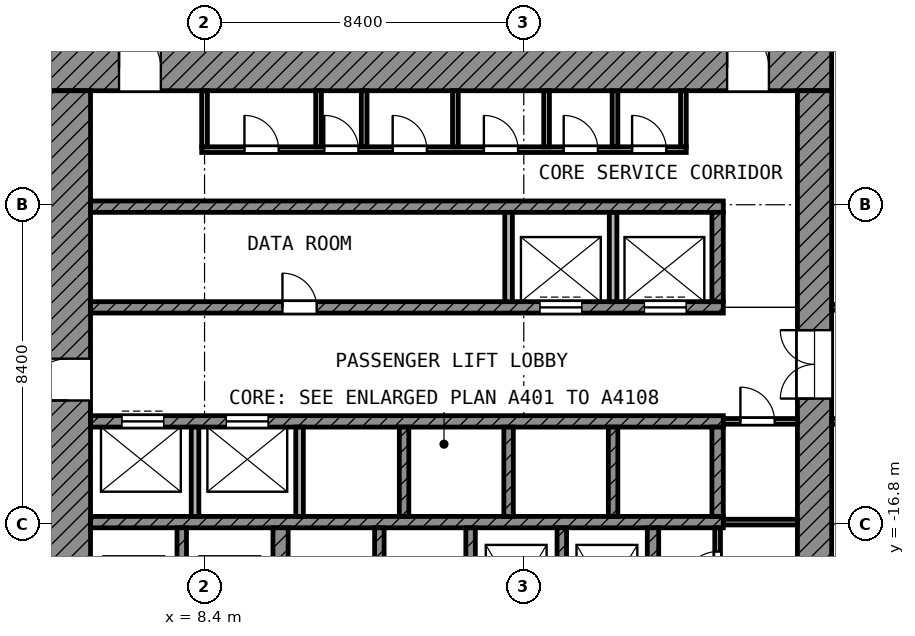
"""IFC4 building model, lengths in metres.
Left out: names, types, materials, properties, quantities, classifications, styles, units other than length and angle.
Written with IfcOpenShell. Run it as: python <this file> out.ifc"""

import sys

from ifc_helpers import new_model, si_unit, direction, frame, frame_2d, origin, place, context, subcontext, project, spatial, rectangle, extrude, element, fill, save


model = new_model("IFC4")
c1 = context("Model", 3, precision=1e-05, world=origin(), true_north=direction((0.0, 1.0)))
c2 = subcontext(c1, "Body", "Model", "MODEL_VIEW")
j1 = project(units=[si_unit("LENGTHUNIT", "METRE"), si_unit("PLANEANGLEUNIT", "RADIAN")], contexts=[c1])
p1 = place(None, origin())
s1 = spatial("IfcSite", under=j1, at=p1, CompositionType="ELEMENT")
p2 = place(p1, origin())
s2 = spatial("IfcBuilding", under=s1, at=p2, CompositionType="ELEMENT")
p3 = place(p2, frame((0.0, 0.0, 196.2)))
s3 = spatial("IfcBuildingStorey", under=s2, at=p3, CompositionType="ELEMENT", Elevation=196.2)
p4 = place(p3, frame((4.2, -4.8, 0.0), z_axis=(0.0, 0.0, 1.0), x_axis=(1.0, 0.0, 0.0)))
e1 = element("IfcWall", 1, at=p4, inside=s3, PredefinedType="SHEAR", context=c2, shape_type="SweptSolid", body=[
    extrude(rectangle(XDim=20.7, YDim=1.2, at=frame_2d((10.35, 0.0))), origin(), (0.0, 0.0, 1.0), 3.6),
])
p5 = place(p4, frame((1.95, 0.0, 0.0)))
e2 = element("IfcOpeningElement", 2, at=p5, cuts=e1, PredefinedType="OPENING", context=c2, shape_type="SweptSolid", body=[
    extrude(rectangle(XDim=1.1, YDim=2.1, at=frame_2d((0.55, 1.05))), frame((0.0, 0.61, 0.0), z_axis=(0.0, -1.0, 0.0), x_axis=(1.0, 0.0, 0.0)), (0.0, 0.0, 1.0), 1.22),
])
p6 = place(p4, frame((17.95, 0.0, 0.0)))
e3 = element("IfcOpeningElement", 3, at=p6, cuts=e1, PredefinedType="OPENING", context=c2, shape_type="SweptSolid", body=[
    extrude(rectangle(XDim=1.1, YDim=2.1, at=frame_2d((0.55, 1.05))), frame((0.0, 0.61, 0.0), z_axis=(0.0, -1.0, 0.0), x_axis=(1.0, 0.0, 0.0)), (0.0, 0.0, 1.0), 1.22),
])
p7 = place(p3, frame((4.8, -24.9, 0.0), z_axis=(0.0, 0.0, 1.0), x_axis=(0.0, 1.0, 0.0)))
e4 = element("IfcWall", 4, at=p7, inside=s3, PredefinedType="SHEAR", context=c2, shape_type="SweptSolid", body=[
    extrude(rectangle(XDim=19.5, YDim=1.2, at=frame_2d((9.75, 0.0))), origin(), (0.0, 0.0, 1.0), 3.6),
])
p8 = place(p7, frame((11.35, 0.0, 0.0)))
e5 = element("IfcOpeningElement", 5, at=p8, cuts=e4, PredefinedType="OPENING", context=c2, shape_type="SweptSolid", body=[
    extrude(rectangle(XDim=1.1, YDim=2.1, at=frame_2d((0.55, 1.05))), frame((0.0, 0.61, 0.0), z_axis=(0.0, -1.0, 0.0), x_axis=(1.0, 0.0, 0.0)), (0.0, 0.0, 1.0), 1.22),
])
p9 = place(p7, frame((2.05, 0.0, 0.0)))
e6 = element("IfcOpeningElement", 6, at=p9, cuts=e4, PredefinedType="OPENING", context=c2, shape_type="SweptSolid", body=[
    extrude(rectangle(XDim=1.1, YDim=2.1, at=frame_2d((0.55, 1.05))), frame((0.0, 0.61, 0.0), z_axis=(0.0, -1.0, 0.0), x_axis=(1.0, 0.0, 0.0)), (0.0, 0.0, 1.0), 1.22),
])
p10 = place(p3, frame((24.45, -24.0, 0.0), z_axis=(0.0, 0.0, 1.0), x_axis=(0.0, 1.0, 0.0)))
e7 = element("IfcWall", 7, at=p10, inside=s3, PredefinedType="SHEAR", context=c2, shape_type="SweptSolid", body=[
    extrude(rectangle(XDim=18.6, YDim=0.9, at=frame_2d((9.3, 0.0))), origin(), (0.0, 0.0, 1.0), 3.6),
])
p11 = place(p10, frame((10.5, 0.0, 0.0)))
e8 = element("IfcOpeningElement", 8, at=p11, cuts=e7, PredefinedType="OPENING", context=c2, shape_type="SweptSolid", body=[
    extrude(rectangle(XDim=1.8, YDim=2.1, at=frame_2d((0.9, 1.05))), frame((0.0, 0.46, 0.0), z_axis=(0.0, -1.0, 0.0), x_axis=(1.0, 0.0, 0.0)), (0.0, 0.0, 1.0), 0.92),
])
p12 = place(p3, frame((5.4, -8.45, 0.0), z_axis=(0.0, 0.0, 1.0), x_axis=(1.0, 0.0, 0.0)))
e9 = element("IfcWall", 9, at=p12, inside=s3, PredefinedType="SHEAR", context=c2, shape_type="SweptSolid", body=[
    extrude(rectangle(XDim=16.65, YDim=0.3, at=frame_2d((8.325, 0.0))), origin(), (0.0, 0.0, 1.0), 3.6),
])
p13 = place(p3, frame((5.4, -11.1, 0.0), z_axis=(0.0, 0.0, 1.0), x_axis=(1.0, 0.0, 0.0)))
e10 = element("IfcWall", 10, at=p13, inside=s3, PredefinedType="SHEAR", context=c2, shape_type="SweptSolid", body=[
    extrude(rectangle(XDim=16.65, YDim=0.3, at=frame_2d((8.325, 0.0))), origin(), (0.0, 0.0, 1.0), 3.6),
])
p14 = place(p13, frame((11.825, 0.0, 0.0)))
e11 = element("IfcOpeningElement", 11, at=p14, cuts=e10, PredefinedType="OPENING", context=c2, shape_type="SweptSolid", body=[
    extrude(rectangle(XDim=1.1, YDim=2.1, at=frame_2d((0.55, 1.05))), frame((0.0, 0.16, 0.0), z_axis=(0.0, -1.0, 0.0), x_axis=(1.0, 0.0, 0.0)), (0.0, 0.0, 1.0), 0.32),
])
p15 = place(p13, frame((14.575, 0.0, 0.0)))
e12 = element("IfcOpeningElement", 12, at=p15, cuts=e10, PredefinedType="OPENING", context=c2, shape_type="SweptSolid", body=[
    extrude(rectangle(XDim=1.1, YDim=2.1, at=frame_2d((0.55, 1.05))), frame((0.0, 0.16, 0.0), z_axis=(0.0, -1.0, 0.0), x_axis=(1.0, 0.0, 0.0)), (0.0, 0.0, 1.0), 0.32),
])
p16 = place(p13, frame((5.05, 0.0, 0.0)))
e13 = element("IfcOpeningElement", 13, at=p16, cuts=e10, PredefinedType="OPENING", context=c2, shape_type="SweptSolid", body=[
    extrude(rectangle(XDim=0.9, YDim=2.1, at=frame_2d((0.45, 1.05))), frame((0.0, 0.16, 0.0), z_axis=(0.0, -1.0, 0.0), x_axis=(1.0, 0.0, 0.0)), (0.0, 0.0, 1.0), 0.32),
])
p17 = place(p3, frame((5.4, -14.1, 0.0), z_axis=(0.0, 0.0, 1.0), x_axis=(1.0, 0.0, 0.0)))
e14 = element("IfcWall", 14, at=p17, inside=s3, PredefinedType="SHEAR", context=c2, shape_type="SweptSolid", body=[
    extrude(rectangle(XDim=16.65, YDim=0.3, at=frame_2d((8.325, 0.0))), origin(), (0.0, 0.0, 1.0), 3.6),
])
p18 = place(p17, frame((0.825, 0.0, 0.0)))
e15 = element("IfcOpeningElement", 15, at=p18, cuts=e14, PredefinedType="OPENING", context=c2, shape_type="SweptSolid", body=[
    extrude(rectangle(XDim=1.1, YDim=2.1, at=frame_2d((0.55, 1.05))), frame((0.0, 0.16, 0.0), z_axis=(0.0, -1.0, 0.0), x_axis=(1.0, 0.0, 0.0)), (0.0, 0.0, 1.0), 0.32),
])
p19 = place(p17, frame((3.575, 0.0, 0.0)))
e16 = element("IfcOpeningElement", 16, at=p19, cuts=e14, PredefinedType="OPENING", context=c2, shape_type="SweptSolid", body=[
    extrude(rectangle(XDim=1.1, YDim=2.1, at=frame_2d((0.55, 1.05))), frame((0.0, 0.16, 0.0), z_axis=(0.0, -1.0, 0.0), x_axis=(1.0, 0.0, 0.0)), (0.0, 0.0, 1.0), 0.32),
])
p20 = place(p3, frame((5.4, -16.75, 0.0), z_axis=(0.0, 0.0, 1.0), x_axis=(1.0, 0.0, 0.0)))
e17 = element("IfcWall", 17, at=p20, inside=s3, PredefinedType="SHEAR", context=c2, shape_type="SweptSolid", body=[
    extrude(rectangle(XDim=16.65, YDim=0.3, at=frame_2d((8.325, 0.0))), origin(), (0.0, 0.0, 1.0), 3.6),
])
p21 = place(p3, frame((10.4, -20.05, 0.0), z_axis=(0.0, 0.0, 1.0), x_axis=(0.0, 1.0, 0.0)))
e18 = element("IfcWall", 18, at=p21, inside=s3, PredefinedType="SHEAR", context=c2, shape_type="SweptSolid", body=[
    extrude(rectangle(XDim=3.15, YDim=0.4, at=frame_2d((1.575, 0.0))), origin(), (0.0, 0.0, 1.0), 3.6),
])
p22 = place(p3, frame((20.2, -20.35, 0.0), z_axis=(0.0, 0.0, 1.0), x_axis=(0.0, 1.0, 0.0)))
e19 = element("IfcWall", 19, at=p22, inside=s3, PredefinedType="SHEAR", context=c2, shape_type="SweptSolid", body=[
    extrude(rectangle(XDim=3.45, YDim=0.3, at=frame_2d((1.725, 0.0))), origin(), (0.0, 0.0, 1.0), 3.6),
])
p23 = place(p3, frame((21.9, -10.95, 0.0), z_axis=(0.0, 0.0, 1.0), x_axis=(0.0, 1.0, 0.0)))
e20 = element("IfcWall", 20, at=p23, inside=s3, PredefinedType="SHEAR", context=c2, shape_type="SweptSolid", body=[
    extrude(rectangle(XDim=2.35, YDim=0.3, at=frame_2d((1.175, 0.0))), origin(), (0.0, 0.0, 1.0), 3.6),
])
p24 = place(p3, frame((21.9, -16.6, 0.0), z_axis=(0.0, 0.0, 1.0), x_axis=(0.0, 1.0, 0.0)))
e21 = element("IfcWall", 21, at=p24, inside=s3, PredefinedType="SHEAR", context=c2, shape_type="SweptSolid", body=[
    extrude(rectangle(XDim=2.35, YDim=0.3, at=frame_2d((1.175, 0.0))), origin(), (0.0, 0.0, 1.0), 3.6),
])
for number, where, z_axis, x_axis in (
    (22, (7.8, -20.05, 0.0), (0.0, 0.0, 1.0), (0.0, 1.0, 0.0)),
    (23, (13.0, -20.05, 0.0), (0.0, 0.0, 1.0), (0.0, 1.0, 0.0)),
    (24, (15.4, -20.05, 0.0), (0.0, 0.0, 1.0), (0.0, 1.0, 0.0)),
    (25, (17.8, -20.05, 0.0), (0.0, 0.0, 1.0), (0.0, 1.0, 0.0)),
):
    element("IfcWall", number, at=place(p3, frame(where, z_axis=z_axis, x_axis=x_axis)), inside=s3, PredefinedType="SHEAR", context=c2, shape_type="SweptSolid", body=[
        extrude(rectangle(XDim=3.15, YDim=0.25, at=frame_2d((1.575, 0.0))), origin(), (0.0, 0.0, 1.0), 3.6),
    ])
for number, where, z_axis, x_axis in (
    (26, (16.4, -10.95, 0.0), (0.0, 0.0, 1.0), (0.0, 1.0, 0.0)),
    (27, (19.15, -10.95, 0.0), (0.0, 0.0, 1.0), (0.0, 1.0, 0.0)),
):
    element("IfcWall", number, at=place(p3, frame(where, z_axis=z_axis, x_axis=x_axis)), inside=s3, PredefinedType="PARTITIONING", context=c2, shape_type="SweptSolid", body=[
        extrude(rectangle(XDim=2.35, YDim=0.2, at=frame_2d((1.175, 0.0))), origin(), (0.0, 0.0, 1.0), 3.6),
    ])
for number, where, z_axis, x_axis in (
    (28, (8.15, -16.6, 0.0), (0.0, 0.0, 1.0), (0.0, 1.0, 0.0)),
    (29, (10.9, -16.6, 0.0), (0.0, 0.0, 1.0), (0.0, 1.0, 0.0)),
):
    element("IfcWall", number, at=place(p3, frame(where, z_axis=z_axis, x_axis=x_axis)), inside=s3, PredefinedType="PARTITIONING", context=c2, shape_type="SweptSolid", body=[
        extrude(rectangle(XDim=2.35, YDim=0.2, at=frame_2d((1.175, 0.0))), origin(), (0.0, 0.0, 1.0), 3.6),
    ])
for number, where, z_axis, x_axis in (
    (30, (13.65, -16.6, 0.0), (0.0, 0.0, 1.0), (0.0, 1.0, 0.0)),
    (31, (16.4, -16.6, 0.0), (0.0, 0.0, 1.0), (0.0, 1.0, 0.0)),
    (32, (19.15, -16.6, 0.0), (0.0, 0.0, 1.0), (0.0, 1.0, 0.0)),
):
    element("IfcWall", number, at=place(p3, frame(where, z_axis=z_axis, x_axis=x_axis)), inside=s3, PredefinedType="SHEAR", context=c2, shape_type="SweptSolid", body=[
        extrude(rectangle(XDim=2.35, YDim=0.25, at=frame_2d((1.175, 0.0))), origin(), (0.0, 0.0, 1.0), 3.6),
    ])
p25 = place(p3, frame((21.9, -19.05, 0.0), z_axis=(0.0, 0.0, 1.0), x_axis=(0.0, 1.0, 0.0)))
e33 = element("IfcWall", 33, at=p25, inside=s3, PredefinedType="PARTITIONING", context=c2, shape_type="SweptSolid", body=[
    extrude(rectangle(XDim=2.15, YDim=0.15, at=frame_2d((1.075, 0.0))), origin(), (0.0, 0.0, 1.0), 3.6),
])
p26 = place(p25, frame((0.625, 0.0, 0.0)))
e34 = element("IfcOpeningElement", 34, at=p26, cuts=e33, PredefinedType="OPENING", context=c2, shape_type="SweptSolid", body=[
    extrude(rectangle(XDim=0.9, YDim=2.1, at=frame_2d((0.45, 1.05))), frame((0.0, 0.085, 0.0), z_axis=(0.0, -1.0, 0.0), x_axis=(1.0, 0.0, 0.0)), (0.0, 0.0, 1.0), 0.17),
])
p27 = place(p3, frame((22.05, -16.75, 0.0), z_axis=(0.0, 0.0, 1.0), x_axis=(1.0, 0.0, 0.0)))
e35 = element("IfcWall", 35, at=p27, inside=s3, PredefinedType="PARTITIONING", context=c2, shape_type="SweptSolid", body=[
    extrude(rectangle(XDim=1.95, YDim=0.15, at=frame_2d((0.975, 0.0))), origin(), (0.0, 0.0, 1.0), 3.6),
])
p28 = place(p3, frame((22.05, -14.1, 0.0), z_axis=(0.0, 0.0, 1.0), x_axis=(1.0, 0.0, 0.0)))
e36 = element("IfcWall", 36, at=p28, inside=s3, PredefinedType="PARTITIONING", context=c2, shape_type="SweptSolid", body=[
    extrude(rectangle(XDim=1.95, YDim=0.15, at=frame_2d((0.975, 0.0))), origin(), (0.0, 0.0, 1.0), 3.6),
])
p29 = place(p28, frame((0.45, 0.0, 0.0)))
e37 = element("IfcOpeningElement", 37, at=p29, cuts=e36, PredefinedType="OPENING", context=c2, shape_type="SweptSolid", body=[
    extrude(rectangle(XDim=0.9, YDim=2.1, at=frame_2d((0.45, 1.05))), frame((0.0, 0.085, 0.0), z_axis=(0.0, -1.0, 0.0), x_axis=(1.0, 0.0, 0.0)), (0.0, 0.0, 1.0), 0.17),
])
p30 = place(p3, frame((8.325, -6.95, 0.0), z_axis=(0.0, 0.0, 1.0), x_axis=(1.0, 0.0, 0.0)))
e38 = element("IfcWall", 38, at=p30, inside=s3, PredefinedType="PARTITIONING", context=c2, shape_type="SweptSolid", body=[
    extrude(rectangle(XDim=12.75, YDim=0.15, at=frame_2d((6.375, 0.0))), origin(), (0.0, 0.0, 1.0), 3.6),
])
p31 = place(p30, frame((1.125, 0.0, 0.0)))
e39 = element("IfcOpeningElement", 39, at=p31, cuts=e38, PredefinedType="OPENING", context=c2, shape_type="SweptSolid", body=[
    extrude(rectangle(XDim=0.9, YDim=2.1, at=frame_2d((0.45, 1.05))), frame((0.0, 0.085, 0.0), z_axis=(0.0, -1.0, 0.0), x_axis=(1.0, 0.0, 0.0)), (0.0, 0.0, 1.0), 0.17),
])
p32 = place(p30, frame((3.225, 0.0, 0.0)))
e40 = element("IfcOpeningElement", 40, at=p32, cuts=e38, PredefinedType="OPENING", context=c2, shape_type="SweptSolid", body=[
    extrude(rectangle(XDim=0.9, YDim=2.1, at=frame_2d((0.45, 1.05))), frame((0.0, 0.085, 0.0), z_axis=(0.0, -1.0, 0.0), x_axis=(1.0, 0.0, 0.0)), (0.0, 0.0, 1.0), 0.17),
])
p33 = place(p30, frame((5.025, 0.0, 0.0)))
e41 = element("IfcOpeningElement", 41, at=p33, cuts=e38, PredefinedType="OPENING", context=c2, shape_type="SweptSolid", body=[
    extrude(rectangle(XDim=0.9, YDim=2.1, at=frame_2d((0.45, 1.05))), frame((0.0, 0.085, 0.0), z_axis=(0.0, -1.0, 0.0), x_axis=(1.0, 0.0, 0.0)), (0.0, 0.0, 1.0), 0.17),
])
p34 = place(p30, frame((7.425, 0.0, 0.0)))
e42 = element("IfcOpeningElement", 42, at=p34, cuts=e38, PredefinedType="OPENING", context=c2, shape_type="SweptSolid", body=[
    extrude(rectangle(XDim=0.9, YDim=2.1, at=frame_2d((0.45, 1.05))), frame((0.0, 0.085, 0.0), z_axis=(0.0, -1.0, 0.0), x_axis=(1.0, 0.0, 0.0)), (0.0, 0.0, 1.0), 0.17),
])
p35 = place(p30, frame((9.525, 0.0, 0.0)))
e43 = element("IfcOpeningElement", 43, at=p35, cuts=e38, PredefinedType="OPENING", context=c2, shape_type="SweptSolid", body=[
    extrude(rectangle(XDim=0.9, YDim=2.1, at=frame_2d((0.45, 1.05))), frame((0.0, 0.085, 0.0), z_axis=(0.0, -1.0, 0.0), x_axis=(1.0, 0.0, 0.0)), (0.0, 0.0, 1.0), 0.17),
])
p36 = place(p30, frame((11.325, 0.0, 0.0)))
e44 = element("IfcOpeningElement", 44, at=p36, cuts=e38, PredefinedType="OPENING", context=c2, shape_type="SweptSolid", body=[
    extrude(rectangle(XDim=0.9, YDim=2.1, at=frame_2d((0.45, 1.05))), frame((0.0, 0.085, 0.0), z_axis=(0.0, -1.0, 0.0), x_axis=(1.0, 0.0, 0.0)), (0.0, 0.0, 1.0), 0.17),
])
for number, where, z_axis, x_axis in (
    (45, (8.4, -6.875, 0.0), (0.0, 0.0, 1.0), (0.0, 1.0, 0.0)),
    (46, (11.4, -6.875, 0.0), (0.0, 0.0, 1.0), (0.0, 1.0, 0.0)),
    (47, (12.6, -6.875, 0.0), (0.0, 0.0, 1.0), (0.0, 1.0, 0.0)),
    (48, (15.0, -6.875, 0.0), (0.0, 0.0, 1.0), (0.0, 1.0, 0.0)),
    (49, (17.4, -6.875, 0.0), (0.0, 0.0, 1.0), (0.0, 1.0, 0.0)),
    (50, (19.2, -6.875, 0.0), (0.0, 0.0, 1.0), (0.0, 1.0, 0.0)),
    (51, (21.0, -6.875, 0.0), (0.0, 0.0, 1.0), (0.0, 1.0, 0.0)),
):
    element("IfcWall", number, at=place(p3, frame(where, z_axis=z_axis, x_axis=x_axis)), inside=s3, PredefinedType="PARTITIONING", context=c2, shape_type="SweptSolid", body=[
        extrude(rectangle(XDim=1.475, YDim=0.15, at=frame_2d((0.738, 0.0))), origin(), (0.0, 0.0, 1.0), 3.6),
    ])
p37 = place(p3, frame((24.9, -14.1, 0.0), z_axis=(0.0, 0.0, 1.0), x_axis=(1.0, 0.0, 0.0)))
e52 = element("IfcWall", 52, at=p37, inside=s3, PredefinedType="PARTITIONING", context=c2, shape_type="SweptSolid", body=[
    extrude(rectangle(XDim=4.425, YDim=0.15, at=frame_2d((2.212, 0.0))), origin(), (0.0, 0.0, 1.0), 3.6),
])
p38 = place(p37, frame((1.65, 0.0, 0.0)))
e53 = element("IfcOpeningElement", 53, at=p38, cuts=e52, PredefinedType="OPENING", context=c2, shape_type="SweptSolid", body=[
    extrude(rectangle(XDim=1.5, YDim=2.1, at=frame_2d((0.75, 1.05))), frame((0.0, 0.085, 0.0), z_axis=(0.0, -1.0, 0.0), x_axis=(1.0, 0.0, 0.0)), (0.0, 0.0, 1.0), 0.17),
])
p39 = place(p3, frame((24.9, -11.1, 0.0), z_axis=(0.0, 0.0, 1.0), x_axis=(1.0, 0.0, 0.0)))
e54 = element("IfcWall", 54, at=p39, inside=s3, PredefinedType="PARTITIONING", context=c2, shape_type="SweptSolid", body=[
    extrude(rectangle(XDim=4.498, YDim=0.15, at=frame_2d((2.249, 0.0))), origin(), (0.0, 0.0, 1.0), 3.6),
])
p40 = place(p39, frame((1.799, 0.0, 0.0)))
e55 = element("IfcOpeningElement", 55, at=p40, cuts=e54, PredefinedType="OPENING", context=c2, shape_type="SweptSolid", body=[
    extrude(rectangle(XDim=1.2, YDim=2.1, at=frame_2d((0.6, 1.05))), frame((0.0, 0.085, 0.0), z_axis=(0.0, -1.0, 0.0), x_axis=(1.0, 0.0, 0.0)), (0.0, 0.0, 1.0), 0.17),
])
p41 = place(p14, origin())
e56 = element("IfcDoor", 56, at=p41, inside=s3, OperationType="DOUBLE_DOOR_SLIDING", PredefinedType="DOOR", context=c2, shape_type="SweptSolid", body=[
    extrude(rectangle(XDim=1.1, YDim=2.1, at=frame_2d((0.55, 1.05))), frame((0.0, 0.025, 0.0), z_axis=(0.0, -1.0, 0.0), x_axis=(1.0, 0.0, 0.0)), (0.0, 0.0, 1.0), 0.05),
])
fill(e11, e56)
p42 = place(p15, origin())
e57 = element("IfcDoor", 57, at=p42, inside=s3, OperationType="DOUBLE_DOOR_SLIDING", PredefinedType="DOOR", context=c2, shape_type="SweptSolid", body=[
    extrude(rectangle(XDim=1.1, YDim=2.1, at=frame_2d((0.55, 1.05))), frame((0.0, 0.025, 0.0), z_axis=(0.0, -1.0, 0.0), x_axis=(1.0, 0.0, 0.0)), (0.0, 0.0, 1.0), 0.05),
])
fill(e12, e57)
p43 = place(p18, origin())
e58 = element("IfcDoor", 58, at=p43, inside=s3, OperationType="DOUBLE_DOOR_SLIDING", PredefinedType="DOOR", context=c2, shape_type="SweptSolid", body=[
    extrude(rectangle(XDim=1.1, YDim=2.1, at=frame_2d((0.55, 1.05))), frame((0.0, 0.025, 0.0), z_axis=(0.0, -1.0, 0.0), x_axis=(1.0, 0.0, 0.0)), (0.0, 0.0, 1.0), 0.05),
])
fill(e15, e58)
p44 = place(p19, origin())
e59 = element("IfcDoor", 59, at=p44, inside=s3, OperationType="DOUBLE_DOOR_SLIDING", PredefinedType="DOOR", context=c2, shape_type="SweptSolid", body=[
    extrude(rectangle(XDim=1.1, YDim=2.1, at=frame_2d((0.55, 1.05))), frame((0.0, 0.025, 0.0), z_axis=(0.0, -1.0, 0.0), x_axis=(1.0, 0.0, 0.0)), (0.0, 0.0, 1.0), 0.05),
])
fill(e16, e59)
p45 = place(p8, origin())
e60 = element("IfcDoor", 60, at=p45, inside=s3, OperationType="SINGLE_SWING_LEFT", PredefinedType="DOOR", context=c2, shape_type="SweptSolid", body=[
    extrude(rectangle(XDim=1.1, YDim=2.1, at=frame_2d((0.55, 1.05))), frame((0.0, 0.025, 0.0), z_axis=(0.0, -1.0, 0.0), x_axis=(1.0, 0.0, 0.0)), (0.0, 0.0, 1.0), 0.05),
])
fill(e5, e60)
p46 = place(p5, origin())
e61 = element("IfcDoor", 61, at=p46, inside=s3, OperationType="SINGLE_SWING_LEFT", PredefinedType="DOOR", context=c2, shape_type="SweptSolid", body=[
    extrude(rectangle(XDim=1.1, YDim=2.1, at=frame_2d((0.55, 1.05))), frame((0.0, 0.025, 0.0), z_axis=(0.0, -1.0, 0.0), x_axis=(1.0, 0.0, 0.0)), (0.0, 0.0, 1.0), 0.05),
])
fill(e2, e61)
p47 = place(p6, origin())
e62 = element("IfcDoor", 62, at=p47, inside=s3, OperationType="SINGLE_SWING_LEFT", PredefinedType="DOOR", context=c2, shape_type="SweptSolid", body=[
    extrude(rectangle(XDim=1.1, YDim=2.1, at=frame_2d((0.55, 1.05))), frame((0.0, 0.025, 0.0), z_axis=(0.0, -1.0, 0.0), x_axis=(1.0, 0.0, 0.0)), (0.0, 0.0, 1.0), 0.05),
])
fill(e3, e62)
p48 = place(p11, origin())
e63 = element("IfcDoor", 63, at=p48, inside=s3, OperationType="DOUBLE_DOOR_SINGLE_SWING", PredefinedType="DOOR", context=c2, shape_type="SweptSolid", body=[
    extrude(rectangle(XDim=1.8, YDim=2.1, at=frame_2d((0.9, 1.05))), frame((0.0, 0.025, 0.0), z_axis=(0.0, -1.0, 0.0), x_axis=(1.0, 0.0, 0.0)), (0.0, 0.0, 1.0), 0.05),
])
fill(e8, e63)
p49 = place(p31, origin())
e64 = element("IfcDoor", 64, at=p49, inside=s3, OperationType="SINGLE_SWING_LEFT", PredefinedType="DOOR", context=c2, shape_type="SweptSolid", body=[
    extrude(rectangle(XDim=0.9, YDim=2.1, at=frame_2d((0.45, 1.05))), frame((0.0, 0.025, 0.0), z_axis=(0.0, -1.0, 0.0), x_axis=(1.0, 0.0, 0.0)), (0.0, 0.0, 1.0), 0.05),
])
fill(e39, e64)
p50 = place(p32, origin())
e65 = element("IfcDoor", 65, at=p50, inside=s3, OperationType="SINGLE_SWING_LEFT", PredefinedType="DOOR", context=c2, shape_type="SweptSolid", body=[
    extrude(rectangle(XDim=0.9, YDim=2.1, at=frame_2d((0.45, 1.05))), frame((0.0, 0.025, 0.0), z_axis=(0.0, -1.0, 0.0), x_axis=(1.0, 0.0, 0.0)), (0.0, 0.0, 1.0), 0.05),
])
fill(e40, e65)
p51 = place(p33, origin())
e66 = element("IfcDoor", 66, at=p51, inside=s3, OperationType="SINGLE_SWING_LEFT", PredefinedType="DOOR", context=c2, shape_type="SweptSolid", body=[
    extrude(rectangle(XDim=0.9, YDim=2.1, at=frame_2d((0.45, 1.05))), frame((0.0, 0.025, 0.0), z_axis=(0.0, -1.0, 0.0), x_axis=(1.0, 0.0, 0.0)), (0.0, 0.0, 1.0), 0.05),
])
fill(e41, e66)
p52 = place(p34, origin())
e67 = element("IfcDoor", 67, at=p52, inside=s3, OperationType="SINGLE_SWING_LEFT", PredefinedType="DOOR", context=c2, shape_type="SweptSolid", body=[
    extrude(rectangle(XDim=0.9, YDim=2.1, at=frame_2d((0.45, 1.05))), frame((0.0, 0.025, 0.0), z_axis=(0.0, -1.0, 0.0), x_axis=(1.0, 0.0, 0.0)), (0.0, 0.0, 1.0), 0.05),
])
fill(e42, e67)
p53 = place(p35, origin())
e68 = element("IfcDoor", 68, at=p53, inside=s3, OperationType="SINGLE_SWING_LEFT", PredefinedType="DOOR", context=c2, shape_type="SweptSolid", body=[
    extrude(rectangle(XDim=0.9, YDim=2.1, at=frame_2d((0.45, 1.05))), frame((0.0, 0.025, 0.0), z_axis=(0.0, -1.0, 0.0), x_axis=(1.0, 0.0, 0.0)), (0.0, 0.0, 1.0), 0.05),
])
fill(e43, e68)
p54 = place(p36, origin())
e69 = element("IfcDoor", 69, at=p54, inside=s3, OperationType="SINGLE_SWING_LEFT", PredefinedType="DOOR", context=c2, shape_type="SweptSolid", body=[
    extrude(rectangle(XDim=0.9, YDim=2.1, at=frame_2d((0.45, 1.05))), frame((0.0, 0.025, 0.0), z_axis=(0.0, -1.0, 0.0), x_axis=(1.0, 0.0, 0.0)), (0.0, 0.0, 1.0), 0.05),
])
fill(e44, e69)
p55 = place(p29, origin())
e70 = element("IfcDoor", 70, at=p55, inside=s3, OperationType="SINGLE_SWING_LEFT", PredefinedType="DOOR", context=c2, shape_type="SweptSolid", body=[
    extrude(rectangle(XDim=0.9, YDim=2.1, at=frame_2d((0.45, 1.05))), frame((0.0, 0.025, 0.0), z_axis=(0.0, -1.0, 0.0), x_axis=(1.0, 0.0, 0.0)), (0.0, 0.0, 1.0), 0.05),
])
fill(e37, e70)
p56 = place(p26, origin())
e71 = element("IfcDoor", 71, at=p56, inside=s3, OperationType="SINGLE_SWING_LEFT", PredefinedType="DOOR", context=c2, shape_type="SweptSolid", body=[
    extrude(rectangle(XDim=0.9, YDim=2.1, at=frame_2d((0.45, 1.05))), frame((0.0, 0.025, 0.0), z_axis=(0.0, -1.0, 0.0), x_axis=(1.0, 0.0, 0.0)), (0.0, 0.0, 1.0), 0.05),
])
fill(e34, e71)
p57 = place(p16, origin())
e72 = element("IfcDoor", 72, at=p57, inside=s3, OperationType="SINGLE_SWING_LEFT", PredefinedType="DOOR", context=c2, shape_type="SweptSolid", body=[
    extrude(rectangle(XDim=0.9, YDim=2.1, at=frame_2d((0.45, 1.05))), frame((0.0, 0.025, 0.0), z_axis=(0.0, -1.0, 0.0), x_axis=(1.0, 0.0, 0.0)), (0.0, 0.0, 1.0), 0.05),
])
fill(e13, e72)
save(model, sys.argv[1])
